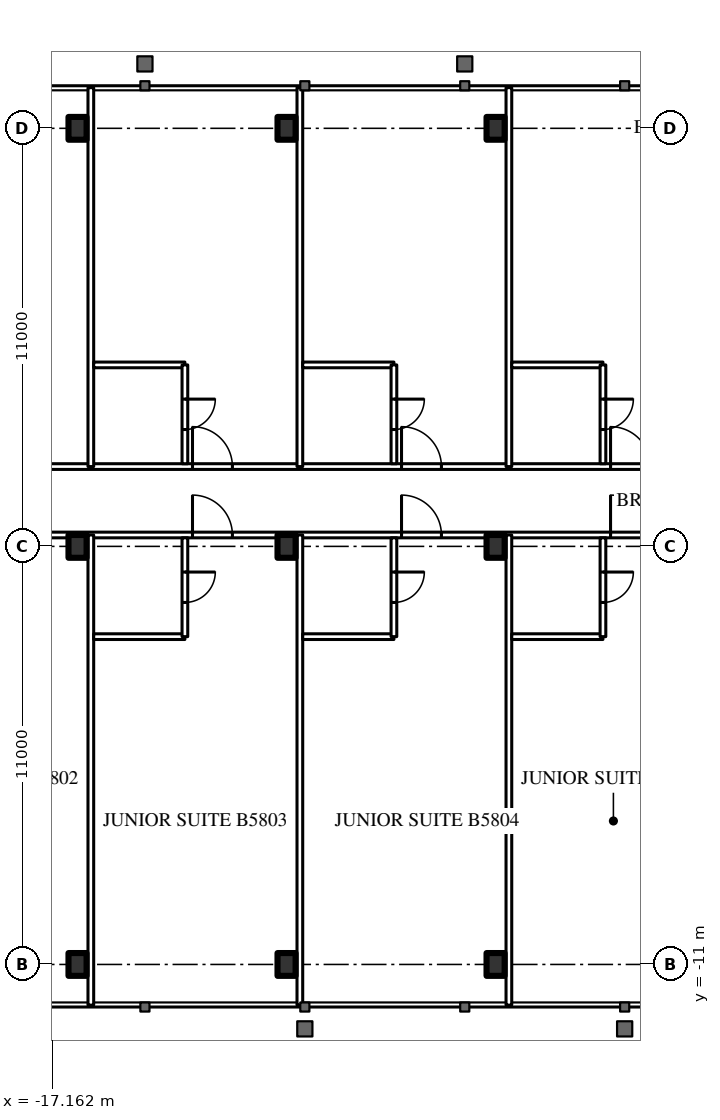
"""IFC4 building model, lengths in metres.
Left out: names, types, materials, properties, quantities, classifications, styles, units other than length and angle.
Written with IfcOpenShell. Run it as: python <this file> out.ifc"""

import sys

from ifc_helpers import new_model, si_unit, direction, frame, frame_2d, origin, origin_2d, place, context, subcontext, project, spatial, rectangle, i_section, extrude, element, fill, save


model = new_model("IFC4")
c1 = context("Model", 3, precision=1e-05, world=origin(), true_north=direction((0.0, 1.0)))
c2 = subcontext(c1, "Body", "Model", "MODEL_VIEW")
j1 = project(units=[si_unit("LENGTHUNIT", "METRE"), si_unit("PLANEANGLEUNIT", "RADIAN")], contexts=[c1])
p1 = place(None, origin())
s1 = spatial("IfcSite", under=j1, at=p1, CompositionType="ELEMENT")
p2 = place(p1, origin())
s2 = spatial("IfcBuilding", under=s1, at=p2, CompositionType="ELEMENT")
p3 = place(p2, frame((0.0, 0.0, 218.9)))
s3 = spatial("IfcBuildingStorey", under=s2, at=p3, CompositionType="ELEMENT", Elevation=218.9)
for number, where, z_axis, x_axis in (
    (1, (-16.5, -11.0, 0.0), (0.0, 0.0, 1.0), (1.0, 0.0, 0.0)),
    (2, (-11.0, -11.0, 0.0), (0.0, 0.0, 1.0), (1.0, 0.0, 0.0)),
    (3, (-5.5, -11.0, 0.0), (0.0, 0.0, 1.0), (1.0, 0.0, 0.0)),
    (4, (-16.5, 0.0, 0.0), (0.0, 0.0, 1.0), (1.0, 0.0, 0.0)),
    (5, (-11.0, 0.0, 0.0), (0.0, 0.0, 1.0), (1.0, 0.0, 0.0)),
    (6, (-5.5, 0.0, 0.0), (0.0, 0.0, 1.0), (1.0, 0.0, 0.0)),
    (7, (-16.5, 11.0, 0.0), (0.0, 0.0, 1.0), (1.0, 0.0, 0.0)),
    (8, (-11.0, 11.0, 0.0), (0.0, 0.0, 1.0), (1.0, 0.0, 0.0)),
    (9, (-5.5, 11.0, 0.0), (0.0, 0.0, 1.0), (1.0, 0.0, 0.0)),
):
    element("IfcColumn", number, at=place(p3, frame(where, z_axis=z_axis, x_axis=x_axis)), inside=s3, PredefinedType="COLUMN", context=c2, shape_type="SweptSolid", body=[
        extrude(i_section(OverallWidth=0.476, OverallDepth=0.6, WebThickness=0.1, FlangeThickness=0.14, FilletRadius=0.02, at=origin_2d()), origin(), (0.0, 0.0, 1.0), 3.6),
    ])
p4 = place(p3, frame((-27.5, 0.3, 0.0), z_axis=(0.0, 0.0, 1.0), x_axis=(1.0, 0.0, 0.0)))
e10 = element("IfcWall", 10, at=p4, inside=s3, PredefinedType="PARTITIONING", context=c2, shape_type="SweptSolid", body=[
    extrude(rectangle(XDim=55.0, YDim=0.15, at=frame_2d((27.5, 0.0))), origin(), (0.0, 0.0, 1.0), 2.4),
])
p5 = place(p4, frame((1.575, 0.0, 0.0)))
e11 = element("IfcOpeningElement", 11, at=p5, cuts=e10, PredefinedType="OPENING", context=c2, shape_type="SweptSolid", body=[
    extrude(rectangle(XDim=1.0, YDim=2.2, at=frame_2d((0.5, 1.1))), frame((0.0, 0.085, 0.0), z_axis=(0.0, -1.0, 0.0), x_axis=(1.0, 0.0, 0.0)), (0.0, 0.0, 1.0), 0.17),
])
p6 = place(p4, frame((8.525, 0.0, 0.0)))
e12 = element("IfcOpeningElement", 12, at=p6, cuts=e10, PredefinedType="OPENING", context=c2, shape_type="SweptSolid", body=[
    extrude(rectangle(XDim=1.05, YDim=2.4, at=frame_2d((0.525, 1.2))), frame((0.0, 0.085, 0.0), z_axis=(0.0, -1.0, 0.0), x_axis=(1.0, 0.0, 0.0)), (0.0, 0.0, 1.0), 0.17),
])
p7 = place(p4, frame((14.025, 0.0, 0.0)))
e13 = element("IfcOpeningElement", 13, at=p7, cuts=e10, PredefinedType="OPENING", context=c2, shape_type="SweptSolid", body=[
    extrude(rectangle(XDim=1.05, YDim=2.4, at=frame_2d((0.525, 1.2))), frame((0.0, 0.085, 0.0), z_axis=(0.0, -1.0, 0.0), x_axis=(1.0, 0.0, 0.0)), (0.0, 0.0, 1.0), 0.17),
])
p8 = place(p4, frame((19.525, 0.0, 0.0)))
e14 = element("IfcOpeningElement", 14, at=p8, cuts=e10, PredefinedType="OPENING", context=c2, shape_type="SweptSolid", body=[
    extrude(rectangle(XDim=1.05, YDim=2.4, at=frame_2d((0.525, 1.2))), frame((0.0, 0.085, 0.0), z_axis=(0.0, -1.0, 0.0), x_axis=(1.0, 0.0, 0.0)), (0.0, 0.0, 1.0), 0.17),
])
p9 = place(p4, frame((25.025, 0.0, 0.0)))
e15 = element("IfcOpeningElement", 15, at=p9, cuts=e10, PredefinedType="OPENING", context=c2, shape_type="SweptSolid", body=[
    extrude(rectangle(XDim=1.05, YDim=2.4, at=frame_2d((0.525, 1.2))), frame((0.0, 0.085, 0.0), z_axis=(0.0, -1.0, 0.0), x_axis=(1.0, 0.0, 0.0)), (0.0, 0.0, 1.0), 0.17),
])
p10 = place(p4, frame((30.525, 0.0, 0.0)))
e16 = element("IfcOpeningElement", 16, at=p10, cuts=e10, PredefinedType="OPENING", context=c2, shape_type="SweptSolid", body=[
    extrude(rectangle(XDim=1.05, YDim=2.4, at=frame_2d((0.525, 1.2))), frame((0.0, 0.085, 0.0), z_axis=(0.0, -1.0, 0.0), x_axis=(1.0, 0.0, 0.0)), (0.0, 0.0, 1.0), 0.17),
])
p11 = place(p4, frame((36.025, 0.0, 0.0)))
e17 = element("IfcOpeningElement", 17, at=p11, cuts=e10, PredefinedType="OPENING", context=c2, shape_type="SweptSolid", body=[
    extrude(rectangle(XDim=1.05, YDim=2.4, at=frame_2d((0.525, 1.2))), frame((0.0, 0.085, 0.0), z_axis=(0.0, -1.0, 0.0), x_axis=(1.0, 0.0, 0.0)), (0.0, 0.0, 1.0), 0.17),
])
p12 = place(p4, frame((41.525, 0.0, 0.0)))
e18 = element("IfcOpeningElement", 18, at=p12, cuts=e10, PredefinedType="OPENING", context=c2, shape_type="SweptSolid", body=[
    extrude(rectangle(XDim=1.05, YDim=2.4, at=frame_2d((0.525, 1.2))), frame((0.0, 0.085, 0.0), z_axis=(0.0, -1.0, 0.0), x_axis=(1.0, 0.0, 0.0)), (0.0, 0.0, 1.0), 0.17),
])
p13 = place(p4, frame((47.025, 0.0, 0.0)))
e19 = element("IfcOpeningElement", 19, at=p13, cuts=e10, PredefinedType="OPENING", context=c2, shape_type="SweptSolid", body=[
    extrude(rectangle(XDim=1.05, YDim=2.4, at=frame_2d((0.525, 1.2))), frame((0.0, 0.085, 0.0), z_axis=(0.0, -1.0, 0.0), x_axis=(1.0, 0.0, 0.0)), (0.0, 0.0, 1.0), 0.17),
])
p14 = place(p4, frame((52.525, 0.0, 0.0)))
e20 = element("IfcOpeningElement", 20, at=p14, cuts=e10, PredefinedType="OPENING", context=c2, shape_type="SweptSolid", body=[
    extrude(rectangle(XDim=1.05, YDim=2.4, at=frame_2d((0.525, 1.2))), frame((0.0, 0.085, 0.0), z_axis=(0.0, -1.0, 0.0), x_axis=(1.0, 0.0, 0.0)), (0.0, 0.0, 1.0), 0.17),
])
p15 = place(p3, frame((-27.5, 2.1, 0.0), z_axis=(0.0, 0.0, 1.0), x_axis=(1.0, 0.0, 0.0)))
e21 = element("IfcWall", 21, at=p15, inside=s3, PredefinedType="PARTITIONING", context=c2, shape_type="SweptSolid", body=[
    extrude(rectangle(XDim=55.0, YDim=0.15, at=frame_2d((27.5, 0.0))), origin(), (0.0, 0.0, 1.0), 3.4),
])
p16 = place(p15, frame((2.025, 0.0, 0.0)))
e22 = element("IfcOpeningElement", 22, at=p16, cuts=e21, PredefinedType="OPENING", context=c2, shape_type="SweptSolid", body=[
    extrude(rectangle(XDim=1.05, YDim=2.4, at=frame_2d((0.525, 1.2))), frame((0.0, 0.085, 0.0), z_axis=(0.0, -1.0, 0.0), x_axis=(1.0, 0.0, 0.0)), (0.0, 0.0, 1.0), 0.17),
])
p17 = place(p15, frame((8.525, 0.0, 0.0)))
e23 = element("IfcOpeningElement", 23, at=p17, cuts=e21, PredefinedType="OPENING", context=c2, shape_type="SweptSolid", body=[
    extrude(rectangle(XDim=1.05, YDim=2.4, at=frame_2d((0.525, 1.2))), frame((0.0, 0.085, 0.0), z_axis=(0.0, -1.0, 0.0), x_axis=(1.0, 0.0, 0.0)), (0.0, 0.0, 1.0), 0.17),
])
p18 = place(p15, frame((14.025, 0.0, 0.0)))
e24 = element("IfcOpeningElement", 24, at=p18, cuts=e21, PredefinedType="OPENING", context=c2, shape_type="SweptSolid", body=[
    extrude(rectangle(XDim=1.05, YDim=2.4, at=frame_2d((0.525, 1.2))), frame((0.0, 0.085, 0.0), z_axis=(0.0, -1.0, 0.0), x_axis=(1.0, 0.0, 0.0)), (0.0, 0.0, 1.0), 0.17),
])
p19 = place(p15, frame((19.525, 0.0, 0.0)))
e25 = element("IfcOpeningElement", 25, at=p19, cuts=e21, PredefinedType="OPENING", context=c2, shape_type="SweptSolid", body=[
    extrude(rectangle(XDim=1.05, YDim=2.4, at=frame_2d((0.525, 1.2))), frame((0.0, 0.085, 0.0), z_axis=(0.0, -1.0, 0.0), x_axis=(1.0, 0.0, 0.0)), (0.0, 0.0, 1.0), 0.17),
])
p20 = place(p15, frame((25.025, 0.0, 0.0)))
e26 = element("IfcOpeningElement", 26, at=p20, cuts=e21, PredefinedType="OPENING", context=c2, shape_type="SweptSolid", body=[
    extrude(rectangle(XDim=1.05, YDim=2.4, at=frame_2d((0.525, 1.2))), frame((0.0, 0.085, 0.0), z_axis=(0.0, -1.0, 0.0), x_axis=(1.0, 0.0, 0.0)), (0.0, 0.0, 1.0), 0.17),
])
p21 = place(p15, frame((30.525, 0.0, 0.0)))
e27 = element("IfcOpeningElement", 27, at=p21, cuts=e21, PredefinedType="OPENING", context=c2, shape_type="SweptSolid", body=[
    extrude(rectangle(XDim=1.05, YDim=2.4, at=frame_2d((0.525, 1.2))), frame((0.0, 0.085, 0.0), z_axis=(0.0, -1.0, 0.0), x_axis=(1.0, 0.0, 0.0)), (0.0, 0.0, 1.0), 0.17),
])
p22 = place(p15, frame((36.025, 0.0, 0.0)))
e28 = element("IfcOpeningElement", 28, at=p22, cuts=e21, PredefinedType="OPENING", context=c2, shape_type="SweptSolid", body=[
    extrude(rectangle(XDim=1.05, YDim=2.4, at=frame_2d((0.525, 1.2))), frame((0.0, 0.085, 0.0), z_axis=(0.0, -1.0, 0.0), x_axis=(1.0, 0.0, 0.0)), (0.0, 0.0, 1.0), 0.17),
])
p23 = place(p15, frame((41.525, 0.0, 0.0)))
e29 = element("IfcOpeningElement", 29, at=p23, cuts=e21, PredefinedType="OPENING", context=c2, shape_type="SweptSolid", body=[
    extrude(rectangle(XDim=1.05, YDim=2.4, at=frame_2d((0.525, 1.2))), frame((0.0, 0.085, 0.0), z_axis=(0.0, -1.0, 0.0), x_axis=(1.0, 0.0, 0.0)), (0.0, 0.0, 1.0), 0.17),
])
p24 = place(p15, frame((47.025, 0.0, 0.0)))
e30 = element("IfcOpeningElement", 30, at=p24, cuts=e21, PredefinedType="OPENING", context=c2, shape_type="SweptSolid", body=[
    extrude(rectangle(XDim=1.05, YDim=2.4, at=frame_2d((0.525, 1.2))), frame((0.0, 0.085, 0.0), z_axis=(0.0, -1.0, 0.0), x_axis=(1.0, 0.0, 0.0)), (0.0, 0.0, 1.0), 0.17),
])
p25 = place(p15, frame((52.525, 0.0, 0.0)))
e31 = element("IfcOpeningElement", 31, at=p25, cuts=e21, PredefinedType="OPENING", context=c2, shape_type="SweptSolid", body=[
    extrude(rectangle(XDim=1.05, YDim=2.4, at=frame_2d((0.525, 1.2))), frame((0.0, 0.085, 0.0), z_axis=(0.0, -1.0, 0.0), x_axis=(1.0, 0.0, 0.0)), (0.0, 0.0, 1.0), 0.17),
])
for number, where, z_axis, x_axis in (
    (32, (-16.15, -12.07, 0.0), (0.0, 0.0, 1.0), (0.0, 1.0, 0.0)),
    (33, (-10.65, -12.07, 0.0), (0.0, 0.0, 1.0), (0.0, 1.0, 0.0)),
    (34, (-5.15, -12.07, 0.0), (0.0, 0.0, 1.0), (0.0, 1.0, 0.0)),
):
    element("IfcWall", number, at=place(p3, frame(where, z_axis=z_axis, x_axis=x_axis)), inside=s3, PredefinedType="PARTITIONING", context=c2, shape_type="SweptSolid", body=[
        extrude(rectangle(XDim=12.37, YDim=0.15, at=frame_2d((6.185, 0.0))), origin(), (0.0, 0.0, 1.0), 3.4),
    ])
p26 = place(p3, frame((-16.075, -2.375, 0.0), z_axis=(0.0, 0.0, 1.0), x_axis=(1.0, 0.0, 0.0)))
e35 = element("IfcWall", 35, at=p26, inside=s3, PredefinedType="PARTITIONING", context=c2, shape_type="SweptSolid", body=[
    extrude(rectangle(XDim=2.4, YDim=0.15, at=frame_2d((1.2, 0.0))), origin(), (0.0, 0.0, 1.0), 3.4),
])
p27 = place(p3, frame((-13.675, -2.375, 0.0), z_axis=(0.0, 0.0, 1.0), x_axis=(0.0, 1.0, 0.0)))
e36 = element("IfcWall", 36, at=p27, inside=s3, PredefinedType="PARTITIONING", context=c2, shape_type="SweptSolid", body=[
    extrude(rectangle(XDim=2.6, YDim=0.15, at=frame_2d((1.3, 0.0))), origin(), (0.0, 0.0, 1.0), 3.4),
])
p28 = place(p27, frame((0.9, 0.0, 0.0)))
e37 = element("IfcOpeningElement", 37, at=p28, cuts=e36, PredefinedType="OPENING", context=c2, shape_type="SweptSolid", body=[
    extrude(rectangle(XDim=0.8, YDim=2.2, at=frame_2d((0.4, 1.1))), frame((0.0, 0.085, 0.0), z_axis=(0.0, -1.0, 0.0), x_axis=(1.0, 0.0, 0.0)), (0.0, 0.0, 1.0), 0.17),
])
p29 = place(p3, frame((-10.575, -2.375, 0.0), z_axis=(0.0, 0.0, 1.0), x_axis=(1.0, 0.0, 0.0)))
e38 = element("IfcWall", 38, at=p29, inside=s3, PredefinedType="PARTITIONING", context=c2, shape_type="SweptSolid", body=[
    extrude(rectangle(XDim=2.4, YDim=0.15, at=frame_2d((1.2, 0.0))), origin(), (0.0, 0.0, 1.0), 3.4),
])
p30 = place(p3, frame((-8.175, -2.375, 0.0), z_axis=(0.0, 0.0, 1.0), x_axis=(0.0, 1.0, 0.0)))
e39 = element("IfcWall", 39, at=p30, inside=s3, PredefinedType="PARTITIONING", context=c2, shape_type="SweptSolid", body=[
    extrude(rectangle(XDim=2.6, YDim=0.15, at=frame_2d((1.3, 0.0))), origin(), (0.0, 0.0, 1.0), 3.4),
])
p31 = place(p30, frame((0.9, 0.0, 0.0)))
e40 = element("IfcOpeningElement", 40, at=p31, cuts=e39, PredefinedType="OPENING", context=c2, shape_type="SweptSolid", body=[
    extrude(rectangle(XDim=0.8, YDim=2.2, at=frame_2d((0.4, 1.1))), frame((0.0, 0.085, 0.0), z_axis=(0.0, -1.0, 0.0), x_axis=(1.0, 0.0, 0.0)), (0.0, 0.0, 1.0), 0.17),
])
p32 = place(p3, frame((-5.075, -2.375, 0.0), z_axis=(0.0, 0.0, 1.0), x_axis=(1.0, 0.0, 0.0)))
e41 = element("IfcWall", 41, at=p32, inside=s3, PredefinedType="PARTITIONING", context=c2, shape_type="SweptSolid", body=[
    extrude(rectangle(XDim=2.4, YDim=0.15, at=frame_2d((1.2, 0.0))), origin(), (0.0, 0.0, 1.0), 3.4),
])
p33 = place(p3, frame((-2.675, -2.375, 0.0), z_axis=(0.0, 0.0, 1.0), x_axis=(0.0, 1.0, 0.0)))
e42 = element("IfcWall", 42, at=p33, inside=s3, PredefinedType="PARTITIONING", context=c2, shape_type="SweptSolid", body=[
    extrude(rectangle(XDim=2.6, YDim=0.15, at=frame_2d((1.3, 0.0))), origin(), (0.0, 0.0, 1.0), 3.4),
])
p34 = place(p33, frame((0.9, 0.0, 0.0)))
e43 = element("IfcOpeningElement", 43, at=p34, cuts=e42, PredefinedType="OPENING", context=c2, shape_type="SweptSolid", body=[
    extrude(rectangle(XDim=0.8, YDim=2.2, at=frame_2d((0.4, 1.1))), frame((0.0, 0.085, 0.0), z_axis=(0.0, -1.0, 0.0), x_axis=(1.0, 0.0, 0.0)), (0.0, 0.0, 1.0), 0.17),
])
for number, where, z_axis, x_axis in (
    (44, (-16.15, 2.1, 0.0), (0.0, 0.0, 1.0), (0.0, 1.0, 0.0)),
    (45, (-10.65, 2.1, 0.0), (0.0, 0.0, 1.0), (0.0, 1.0, 0.0)),
    (46, (-5.15, 2.1, 0.0), (0.0, 0.0, 1.0), (0.0, 1.0, 0.0)),
):
    element("IfcWall", number, at=place(p3, frame(where, z_axis=z_axis, x_axis=x_axis)), inside=s3, PredefinedType="PARTITIONING", context=c2, shape_type="SweptSolid", body=[
        extrude(rectangle(XDim=9.97, YDim=0.15, at=frame_2d((4.985, 0.0))), origin(), (0.0, 0.0, 1.0), 3.4),
    ])
p35 = place(p3, frame((-16.075, 4.775, 0.0), z_axis=(0.0, 0.0, 1.0), x_axis=(1.0, 0.0, 0.0)))
e47 = element("IfcWall", 47, at=p35, inside=s3, PredefinedType="PARTITIONING", context=c2, shape_type="SweptSolid", body=[
    extrude(rectangle(XDim=2.4, YDim=0.15, at=frame_2d((1.2, 0.0))), origin(), (0.0, 0.0, 1.0), 3.4),
])
p36 = place(p3, frame((-13.675, 2.175, 0.0), z_axis=(0.0, 0.0, 1.0), x_axis=(0.0, 1.0, 0.0)))
e48 = element("IfcWall", 48, at=p36, inside=s3, PredefinedType="PARTITIONING", context=c2, shape_type="SweptSolid", body=[
    extrude(rectangle(XDim=2.6, YDim=0.15, at=frame_2d((1.3, 0.0))), origin(), (0.0, 0.0, 1.0), 3.4),
])
p37 = place(p36, frame((0.9, 0.0, 0.0)))
e49 = element("IfcOpeningElement", 49, at=p37, cuts=e48, PredefinedType="OPENING", context=c2, shape_type="SweptSolid", body=[
    extrude(rectangle(XDim=0.8, YDim=2.2, at=frame_2d((0.4, 1.1))), frame((0.0, 0.085, 0.0), z_axis=(0.0, -1.0, 0.0), x_axis=(1.0, 0.0, 0.0)), (0.0, 0.0, 1.0), 0.17),
])
p38 = place(p3, frame((-10.575, 4.775, 0.0), z_axis=(0.0, 0.0, 1.0), x_axis=(1.0, 0.0, 0.0)))
e50 = element("IfcWall", 50, at=p38, inside=s3, PredefinedType="PARTITIONING", context=c2, shape_type="SweptSolid", body=[
    extrude(rectangle(XDim=2.4, YDim=0.15, at=frame_2d((1.2, 0.0))), origin(), (0.0, 0.0, 1.0), 3.4),
])
p39 = place(p3, frame((-8.175, 2.175, 0.0), z_axis=(0.0, 0.0, 1.0), x_axis=(0.0, 1.0, 0.0)))
e51 = element("IfcWall", 51, at=p39, inside=s3, PredefinedType="PARTITIONING", context=c2, shape_type="SweptSolid", body=[
    extrude(rectangle(XDim=2.6, YDim=0.15, at=frame_2d((1.3, 0.0))), origin(), (0.0, 0.0, 1.0), 3.4),
])
p40 = place(p39, frame((0.9, 0.0, 0.0)))
e52 = element("IfcOpeningElement", 52, at=p40, cuts=e51, PredefinedType="OPENING", context=c2, shape_type="SweptSolid", body=[
    extrude(rectangle(XDim=0.8, YDim=2.2, at=frame_2d((0.4, 1.1))), frame((0.0, 0.085, 0.0), z_axis=(0.0, -1.0, 0.0), x_axis=(1.0, 0.0, 0.0)), (0.0, 0.0, 1.0), 0.17),
])
p41 = place(p3, frame((-5.075, 4.775, 0.0), z_axis=(0.0, 0.0, 1.0), x_axis=(1.0, 0.0, 0.0)))
e53 = element("IfcWall", 53, at=p41, inside=s3, PredefinedType="PARTITIONING", context=c2, shape_type="SweptSolid", body=[
    extrude(rectangle(XDim=2.4, YDim=0.15, at=frame_2d((1.2, 0.0))), origin(), (0.0, 0.0, 1.0), 3.4),
])
p42 = place(p3, frame((-2.675, 2.175, 0.0), z_axis=(0.0, 0.0, 1.0), x_axis=(0.0, 1.0, 0.0)))
e54 = element("IfcWall", 54, at=p42, inside=s3, PredefinedType="PARTITIONING", context=c2, shape_type="SweptSolid", body=[
    extrude(rectangle(XDim=2.6, YDim=0.15, at=frame_2d((1.3, 0.0))), origin(), (0.0, 0.0, 1.0), 3.4),
])
p43 = place(p42, frame((0.9, 0.0, 0.0)))
e55 = element("IfcOpeningElement", 55, at=p43, cuts=e54, PredefinedType="OPENING", context=c2, shape_type="SweptSolid", body=[
    extrude(rectangle(XDim=0.8, YDim=2.2, at=frame_2d((0.4, 1.1))), frame((0.0, 0.085, 0.0), z_axis=(0.0, -1.0, 0.0), x_axis=(1.0, 0.0, 0.0)), (0.0, 0.0, 1.0), 0.17),
])
p44 = place(p28, origin())
e56 = element("IfcDoor", 56, at=p44, inside=s3, OperationType="SINGLE_SWING_RIGHT", PredefinedType="DOOR", context=c2, shape_type="SweptSolid", body=[
    extrude(rectangle(XDim=0.8, YDim=2.2, at=frame_2d((0.4, 1.1))), frame((0.0, 0.025, 0.0), z_axis=(0.0, -1.0, 0.0), x_axis=(1.0, 0.0, 0.0)), (0.0, 0.0, 1.0), 0.05),
])
fill(e37, e56)
p45 = place(p7, origin())
e57 = element("IfcDoor", 57, at=p45, inside=s3, OperationType="SINGLE_SWING_LEFT", PredefinedType="DOOR", context=c2, shape_type="SweptSolid", body=[
    extrude(rectangle(XDim=1.05, YDim=2.4, at=frame_2d((0.525, 1.2))), frame((0.0, 0.025, 0.0), z_axis=(0.0, -1.0, 0.0), x_axis=(1.0, 0.0, 0.0)), (0.0, 0.0, 1.0), 0.05),
])
fill(e13, e57)
p46 = place(p31, origin())
e58 = element("IfcDoor", 58, at=p46, inside=s3, OperationType="SINGLE_SWING_RIGHT", PredefinedType="DOOR", context=c2, shape_type="SweptSolid", body=[
    extrude(rectangle(XDim=0.8, YDim=2.2, at=frame_2d((0.4, 1.1))), frame((0.0, 0.025, 0.0), z_axis=(0.0, -1.0, 0.0), x_axis=(1.0, 0.0, 0.0)), (0.0, 0.0, 1.0), 0.05),
])
fill(e40, e58)
p47 = place(p8, origin())
e59 = element("IfcDoor", 59, at=p47, inside=s3, OperationType="SINGLE_SWING_LEFT", PredefinedType="DOOR", context=c2, shape_type="SweptSolid", body=[
    extrude(rectangle(XDim=1.05, YDim=2.4, at=frame_2d((0.525, 1.2))), frame((0.0, 0.025, 0.0), z_axis=(0.0, -1.0, 0.0), x_axis=(1.0, 0.0, 0.0)), (0.0, 0.0, 1.0), 0.05),
])
fill(e14, e59)
p48 = place(p34, origin())
e60 = element("IfcDoor", 60, at=p48, inside=s3, OperationType="SINGLE_SWING_RIGHT", PredefinedType="DOOR", context=c2, shape_type="SweptSolid", body=[
    extrude(rectangle(XDim=0.8, YDim=2.2, at=frame_2d((0.4, 1.1))), frame((0.0, 0.025, 0.0), z_axis=(0.0, -1.0, 0.0), x_axis=(1.0, 0.0, 0.0)), (0.0, 0.0, 1.0), 0.05),
])
fill(e43, e60)
p49 = place(p9, origin())
e61 = element("IfcDoor", 61, at=p49, inside=s3, OperationType="SINGLE_SWING_LEFT", PredefinedType="DOOR", context=c2, shape_type="SweptSolid", body=[
    extrude(rectangle(XDim=1.05, YDim=2.4, at=frame_2d((0.525, 1.2))), frame((0.0, 0.025, 0.0), z_axis=(0.0, -1.0, 0.0), x_axis=(1.0, 0.0, 0.0)), (0.0, 0.0, 1.0), 0.05),
])
fill(e15, e61)
p50 = place(p37, origin())
e62 = element("IfcDoor", 62, at=p50, inside=s3, OperationType="SINGLE_SWING_RIGHT", PredefinedType="DOOR", context=c2, shape_type="SweptSolid", body=[
    extrude(rectangle(XDim=0.8, YDim=2.2, at=frame_2d((0.4, 1.1))), frame((0.0, 0.025, 0.0), z_axis=(0.0, -1.0, 0.0), x_axis=(1.0, 0.0, 0.0)), (0.0, 0.0, 1.0), 0.05),
])
fill(e49, e62)
p51 = place(p18, origin())
e63 = element("IfcDoor", 63, at=p51, inside=s3, OperationType="SINGLE_SWING_LEFT", PredefinedType="DOOR", context=c2, shape_type="SweptSolid", body=[
    extrude(rectangle(XDim=1.05, YDim=2.4, at=frame_2d((0.525, 1.2))), frame((0.0, 0.025, 0.0), z_axis=(0.0, -1.0, 0.0), x_axis=(1.0, 0.0, 0.0)), (0.0, 0.0, 1.0), 0.05),
])
fill(e24, e63)
p52 = place(p40, origin())
e64 = element("IfcDoor", 64, at=p52, inside=s3, OperationType="SINGLE_SWING_RIGHT", PredefinedType="DOOR", context=c2, shape_type="SweptSolid", body=[
    extrude(rectangle(XDim=0.8, YDim=2.2, at=frame_2d((0.4, 1.1))), frame((0.0, 0.025, 0.0), z_axis=(0.0, -1.0, 0.0), x_axis=(1.0, 0.0, 0.0)), (0.0, 0.0, 1.0), 0.05),
])
fill(e52, e64)
p53 = place(p19, origin())
e65 = element("IfcDoor", 65, at=p53, inside=s3, OperationType="SINGLE_SWING_LEFT", PredefinedType="DOOR", context=c2, shape_type="SweptSolid", body=[
    extrude(rectangle(XDim=1.05, YDim=2.4, at=frame_2d((0.525, 1.2))), frame((0.0, 0.025, 0.0), z_axis=(0.0, -1.0, 0.0), x_axis=(1.0, 0.0, 0.0)), (0.0, 0.0, 1.0), 0.05),
])
fill(e25, e65)
p54 = place(p43, origin())
e66 = element("IfcDoor", 66, at=p54, inside=s3, OperationType="SINGLE_SWING_RIGHT", PredefinedType="DOOR", context=c2, shape_type="SweptSolid", body=[
    extrude(rectangle(XDim=0.8, YDim=2.2, at=frame_2d((0.4, 1.1))), frame((0.0, 0.025, 0.0), z_axis=(0.0, -1.0, 0.0), x_axis=(1.0, 0.0, 0.0)), (0.0, 0.0, 1.0), 0.05),
])
fill(e55, e66)
p55 = place(p20, origin())
e67 = element("IfcDoor", 67, at=p55, inside=s3, OperationType="SINGLE_SWING_LEFT", PredefinedType="DOOR", context=c2, shape_type="SweptSolid", body=[
    extrude(rectangle(XDim=1.05, YDim=2.4, at=frame_2d((0.525, 1.2))), frame((0.0, 0.025, 0.0), z_axis=(0.0, -1.0, 0.0), x_axis=(1.0, 0.0, 0.0)), (0.0, 0.0, 1.0), 0.05),
])
fill(e26, e67)
save(model, sys.argv[1])
